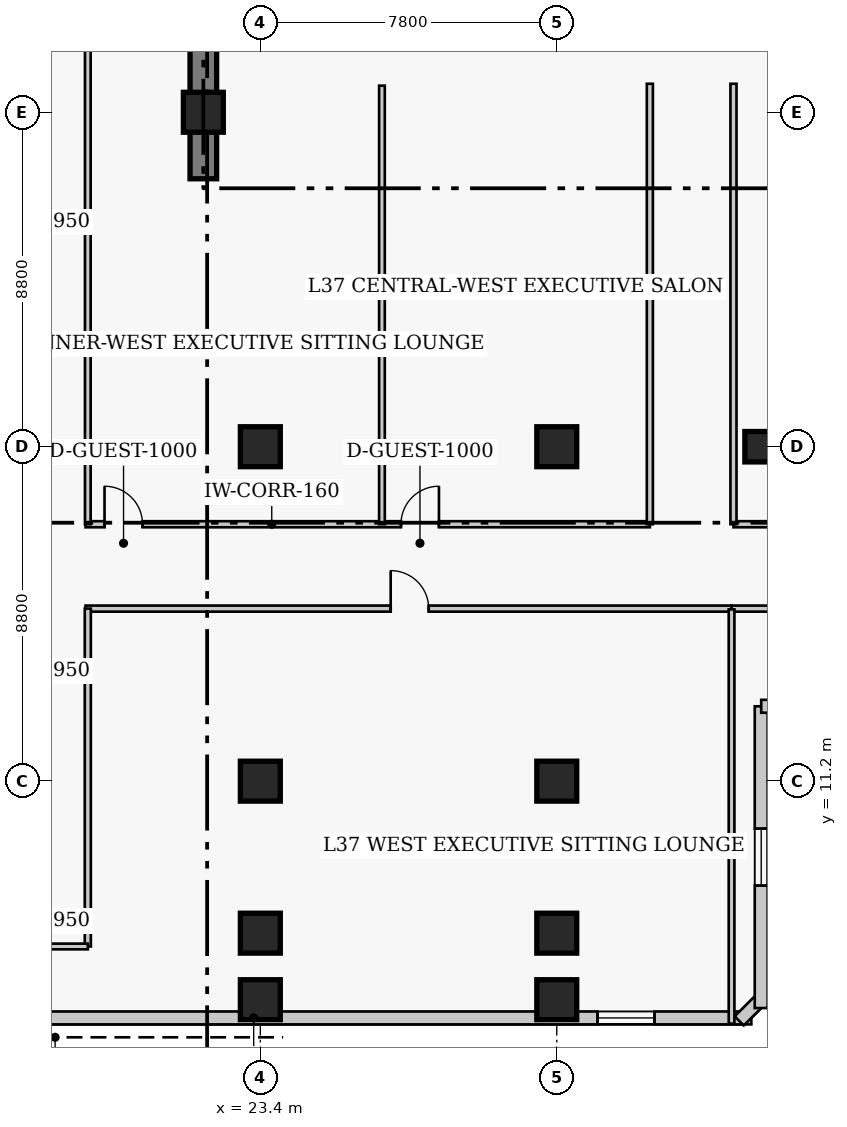
"""IFC4 building model, lengths in metres.
Left out: names, types, materials, properties, quantities, classifications, styles, units other than length and angle.
Written with IfcOpenShell. Run it as: python <this file> out.ifc"""

import sys

from ifc_helpers import new_model, si_unit, direction, frame, frame_2d, origin, origin_2d, place, context, subcontext, project, spatial, rectangle, extrude, element, fill, save


model = new_model("IFC4")
c1 = context("Model", 3, precision=1e-05, world=origin(), true_north=direction((0.0, 1.0)))
c2 = subcontext(c1, "Body", "Model", "MODEL_VIEW")
j1 = project(units=[si_unit("LENGTHUNIT", "METRE"), si_unit("PLANEANGLEUNIT", "RADIAN")], contexts=[c1])
p1 = place(None, origin())
s1 = spatial("IfcSite", under=j1, at=p1, CompositionType="ELEMENT")
p2 = place(p1, origin())
s2 = spatial("IfcBuilding", under=s1, at=p2, CompositionType="ELEMENT")
p3 = place(p2, frame((0.0, 0.0, 149.8)))
s3 = spatial("IfcBuildingStorey", under=s2, at=p3, CompositionType="ELEMENT", Elevation=149.8)
p4 = place(p3, frame((21.9, 27.05, 0.0), z_axis=(0.0, 0.0, 1.0), x_axis=(0.0, 1.0, 0.0)))
e1 = element("IfcWall", 1, at=p4, inside=s3, PredefinedType="SHEAR", context=c2, shape_type="SweptSolid", body=[
    extrude(rectangle(XDim=13.62, YDim=0.7, at=frame_2d((6.81, 0.0))), origin(), (0.0, 0.0, 1.0), 3.8),
])
for number, where, z_axis, x_axis in (
    (2, (23.4, 11.2, 0.0), (0.0, 0.0, 1.0), (1.0, 0.0, 0.0)),
    (3, (23.4, 20.0, 0.0), (0.0, 0.0, 1.0), (1.0, 0.0, 0.0)),
    (4, (31.2, 11.2, 0.0), (0.0, 0.0, 1.0), (1.0, 0.0, 0.0)),
    (5, (31.2, 20.0, 0.0), (0.0, 0.0, 1.0), (1.0, 0.0, 0.0)),
):
    element("IfcColumn", number, at=place(p3, frame(where, z_axis=z_axis, x_axis=x_axis)), inside=s3, PredefinedType="COLUMN", context=c2, shape_type="SweptSolid", body=[
        extrude(rectangle(XDim=1.05, YDim=1.05, at=origin_2d()), origin(), (0.0, 0.0, 1.0), 3.8),
    ])
p5 = place(p3, frame((36.75, 20.0, 0.0), z_axis=(0.0, 0.0, 1.0), x_axis=(1.0, 0.0, 0.0)))
e6 = element("IfcColumn", 6, at=p5, inside=s3, PredefinedType="COLUMN", context=c2, shape_type="SweptSolid", body=[
    extrude(rectangle(XDim=1.2, YDim=0.8, at=origin_2d()), origin(), (0.0, 0.0, 1.0), 3.8),
])
for number, where, z_axis, x_axis in (
    (7, (21.9, 28.8, 0.0), (0.0, 0.0, 1.0), (1.0, 0.0, 0.0)),
    (8, (23.4, 7.2, 0.0), (0.0, 0.0, 1.0), (1.0, 0.0, 0.0)),
    (9, (31.2, 7.2, 0.0), (0.0, 0.0, 1.0), (1.0, 0.0, 0.0)),
    (10, (23.4, 5.45, 0.0), (0.0, 0.0, 1.0), (1.0, 0.0, 0.0)),
    (11, (31.2, 5.45, 0.0), (0.0, 0.0, 1.0), (1.0, 0.0, 0.0)),
):
    element("IfcColumn", number, at=place(p3, frame(where, z_axis=z_axis, x_axis=x_axis)), inside=s3, PredefinedType="COLUMN", context=c2, shape_type="SweptSolid", body=[
        extrude(rectangle(XDim=1.05, YDim=1.05, at=origin_2d()), origin(), (0.0, 0.0, 1.0), 3.8),
    ])
p6 = place(p3, frame((9.63, 4.97, 0.0), z_axis=(0.0, 0.0, 1.0), x_axis=(1.0, 0.0, 0.0)))
e12 = element("IfcWall", 12, at=p6, inside=s3, PredefinedType="SOLIDWALL", context=c2, shape_type="SweptSolid", body=[
    extrude(rectangle(XDim=26.69, YDim=0.34, at=frame_2d((13.345, 0.0))), origin(), (0.0, 0.0, 1.0), 3.55),
])
p7 = place(p6, frame((3.048, 0.0, 0.85)))
e13 = element("IfcOpeningElement", 13, at=p7, cuts=e12, PredefinedType="OPENING", context=c2, shape_type="SweptSolid", body=[
    extrude(rectangle(XDim=1.5, YDim=1.75, at=frame_2d((0.75, 0.875))), frame((0.0, 0.18, 0.0), z_axis=(0.0, -1.0, 0.0), x_axis=(1.0, 0.0, 0.0)), (0.0, 0.0, 1.0), 0.36),
])
p8 = place(p6, frame((22.642, 0.0, 0.85)))
e14 = element("IfcOpeningElement", 14, at=p8, cuts=e12, PredefinedType="OPENING", context=c2, shape_type="SweptSolid", body=[
    extrude(rectangle(XDim=1.5, YDim=1.75, at=frame_2d((0.75, 0.875))), frame((0.0, 0.18, 0.0), z_axis=(0.0, -1.0, 0.0), x_axis=(1.0, 0.0, 0.0)), (0.0, 0.0, 1.0), 0.36),
])
p9 = place(p3, frame((36.001, 4.892, 0.0), z_axis=(0.0, 0.0, 1.0), x_axis=(0.707106781187, 0.707106781187, 0.0)))
e15 = element("IfcWall", 15, at=p9, inside=s3, PredefinedType="SOLIDWALL", context=c2, shape_type="SweptSolid", body=[
    extrude(rectangle(XDim=0.929, YDim=0.34, at=frame_2d((0.464, 0.0))), origin(), (0.0, 0.0, 1.0), 3.55),
])
p10 = place(p3, frame((36.58, 5.23, 0.0), z_axis=(0.0, 0.0, 1.0), x_axis=(0.0, 1.0, 0.0)))
e16 = element("IfcWall", 16, at=p10, inside=s3, PredefinedType="SOLIDWALL", context=c2, shape_type="SweptSolid", body=[
    extrude(rectangle(XDim=7.94, YDim=0.34, at=frame_2d((3.97, 0.0))), origin(), (0.0, 0.0, 1.0), 3.55),
])
p11 = place(p10, frame((3.22, 0.0, 0.85)))
e17 = element("IfcOpeningElement", 17, at=p11, cuts=e16, PredefinedType="OPENING", context=c2, shape_type="SweptSolid", body=[
    extrude(rectangle(XDim=1.5, YDim=1.75, at=frame_2d((0.75, 0.875))), frame((0.0, 0.18, 0.0), z_axis=(0.0, -1.0, 0.0), x_axis=(1.0, 0.0, 0.0)), (0.0, 0.0, 1.0), 0.36),
])
p12 = place(p3, frame((36.58, 13.17, 0.0), z_axis=(0.0, 0.0, 1.0), x_axis=(1.0, 0.0, 0.0)))
e18 = element("IfcWall", 18, at=p12, inside=s3, PredefinedType="SOLIDWALL", context=c2, shape_type="SweptSolid", body=[
    extrude(rectangle(XDim=4.84, YDim=0.34, at=frame_2d((2.42, 0.0))), origin(), (0.0, 0.0, 1.0), 3.55),
])
p13 = place(p12, frame((1.67, 0.0, 0.85)))
e19 = element("IfcOpeningElement", 19, at=p13, cuts=e18, PredefinedType="OPENING", context=c2, shape_type="SweptSolid", body=[
    extrude(rectangle(XDim=1.5, YDim=1.75, at=frame_2d((0.75, 0.875))), frame((0.0, 0.18, 0.0), z_axis=(0.0, -1.0, 0.0), x_axis=(1.0, 0.0, 0.0)), (0.0, 0.0, 1.0), 0.36),
])
p14 = place(p3, frame((18.8, 17.96, 0.0), z_axis=(0.0, 0.0, 1.0), x_axis=(1.0, 0.0, 0.0)))
e20 = element("IfcWall", 20, at=p14, inside=s3, PredefinedType="PARTITIONING", context=c2, shape_type="SweptSolid", body=[
    extrude(rectangle(XDim=14.85, YDim=0.16, at=frame_2d((7.425, 0.0))), origin(), (0.0, 0.0, 1.0), 3.55),
])
p15 = place(p14, frame((0.5, 0.0, 0.0)))
e21 = element("IfcOpeningElement", 21, at=p15, cuts=e20, PredefinedType="OPENING", context=c2, shape_type="SweptSolid", body=[
    extrude(rectangle(XDim=1.0, YDim=2.15, at=frame_2d((0.5, 1.075))), frame((0.0, 0.09, 0.0), z_axis=(0.0, -1.0, 0.0), x_axis=(1.0, 0.0, 0.0)), (0.0, 0.0, 1.0), 0.18),
])
p16 = place(p14, frame((8.3, 0.0, 0.0)))
e22 = element("IfcOpeningElement", 22, at=p16, cuts=e20, PredefinedType="OPENING", context=c2, shape_type="SweptSolid", body=[
    extrude(rectangle(XDim=1.0, YDim=2.15, at=frame_2d((0.5, 1.075))), frame((0.0, 0.09, 0.0), z_axis=(0.0, -1.0, 0.0), x_axis=(1.0, 0.0, 0.0)), (0.0, 0.0, 1.0), 0.18),
])
p17 = place(p3, frame((35.85, 17.96, 0.0), z_axis=(0.0, 0.0, 1.0), x_axis=(1.0, 0.0, 0.0)))
e23 = element("IfcWall", 23, at=p17, inside=s3, PredefinedType="PARTITIONING", context=c2, shape_type="SweptSolid", body=[
    extrude(rectangle(XDim=23.45, YDim=0.16, at=frame_2d((11.725, 0.0))), origin(), (0.0, 0.0, 1.0), 3.55),
])
p18 = place(p17, frame((6.45, 0.0, 0.0)))
e24 = element("IfcOpeningElement", 24, at=p18, cuts=e23, PredefinedType="OPENING", context=c2, shape_type="SweptSolid", body=[
    extrude(rectangle(XDim=1.0, YDim=2.15, at=frame_2d((0.5, 1.075))), frame((0.0, 0.09, 0.0), z_axis=(0.0, -1.0, 0.0), x_axis=(1.0, 0.0, 0.0)), (0.0, 0.0, 1.0), 0.18),
])
p19 = place(p17, frame((16.25, 0.0, 0.0)))
e25 = element("IfcOpeningElement", 25, at=p19, cuts=e23, PredefinedType="OPENING", context=c2, shape_type="SweptSolid", body=[
    extrude(rectangle(XDim=1.0, YDim=2.15, at=frame_2d((0.5, 1.075))), frame((0.0, 0.09, 0.0), z_axis=(0.0, -1.0, 0.0), x_axis=(1.0, 0.0, 0.0)), (0.0, 0.0, 1.0), 0.18),
])
for number, where, z_axis, x_axis in (
    (26, (33.65, 17.96, 0.0), (0.0, 0.0, 1.0), (0.0, 1.0, 0.0)),
    (27, (35.85, 17.96, 0.0), (0.0, 0.0, 1.0), (0.0, 1.0, 0.0)),
):
    element("IfcWall", number, at=place(p3, frame(where, z_axis=z_axis, x_axis=x_axis)), inside=s3, PredefinedType="PARTITIONING", context=c2, shape_type="SweptSolid", body=[
        extrude(rectangle(XDim=11.59, YDim=0.16, at=frame_2d((5.795, 0.0))), origin(), (0.0, 0.0, 1.0), 3.55),
    ])
p20 = place(p3, frame((18.8, 15.74, 0.0), z_axis=(0.0, 0.0, 1.0), x_axis=(1.0, 0.0, 0.0)))
e28 = element("IfcWall", 28, at=p20, inside=s3, PredefinedType="PARTITIONING", context=c2, shape_type="SweptSolid", body=[
    extrude(rectangle(XDim=17.0, YDim=0.16, at=frame_2d((8.5, 0.0))), origin(), (0.0, 0.0, 1.0), 3.55),
])
p21 = place(p20, frame((8.03, 0.0, 0.0)))
e29 = element("IfcOpeningElement", 29, at=p21, cuts=e28, PredefinedType="OPENING", context=c2, shape_type="SweptSolid", body=[
    extrude(rectangle(XDim=1.0, YDim=2.15, at=frame_2d((0.5, 1.075))), frame((0.0, 0.09, 0.0), z_axis=(0.0, -1.0, 0.0), x_axis=(1.0, 0.0, 0.0)), (0.0, 0.0, 1.0), 0.18),
])
p22 = place(p3, frame((35.8, 15.74, 0.0), z_axis=(0.0, 0.0, 1.0), x_axis=(1.0, 0.0, 0.0)))
e30 = element("IfcWall", 30, at=p22, inside=s3, PredefinedType="PARTITIONING", context=c2, shape_type="SweptSolid", body=[
    extrude(rectangle(XDim=23.5, YDim=0.16, at=frame_2d((11.75, 0.0))), origin(), (0.0, 0.0, 1.0), 3.55),
])
p23 = place(p22, frame((3.66, 0.0, 0.0)))
e31 = element("IfcOpeningElement", 31, at=p23, cuts=e30, PredefinedType="OPENING", context=c2, shape_type="SweptSolid", body=[
    extrude(rectangle(XDim=0.95, YDim=2.1, at=frame_2d((0.475, 1.05))), frame((0.0, 0.09, 0.0), z_axis=(0.0, -1.0, 0.0), x_axis=(1.0, 0.0, 0.0)), (0.0, 0.0, 1.0), 0.18),
])
p24 = place(p22, frame((16.805, 0.0, 0.0)))
e32 = element("IfcOpeningElement", 32, at=p24, cuts=e30, PredefinedType="OPENING", context=c2, shape_type="SweptSolid", body=[
    extrude(rectangle(XDim=1.0, YDim=2.15, at=frame_2d((0.5, 1.075))), frame((0.0, 0.09, 0.0), z_axis=(0.0, -1.0, 0.0), x_axis=(1.0, 0.0, 0.0)), (0.0, 0.0, 1.0), 0.18),
])
p25 = place(p3, frame((18.86, 6.85, 0.0), z_axis=(0.0, 0.0, 1.0), x_axis=(0.0, 1.0, 0.0)))
e33 = element("IfcWall", 33, at=p25, inside=s3, PredefinedType="PARTITIONING", context=c2, shape_type="SweptSolid", body=[
    extrude(rectangle(XDim=8.89, YDim=0.16, at=frame_2d((4.445, 0.0))), origin(), (0.0, 0.0, 1.0), 3.55),
])
p26 = place(p3, frame((16.64, 6.85, 0.0), z_axis=(0.0, 0.0, 1.0), x_axis=(1.0, 0.0, 0.0)))
e34 = element("IfcWall", 34, at=p26, inside=s3, PredefinedType="PARTITIONING", context=c2, shape_type="SweptSolid", body=[
    extrude(rectangle(XDim=2.22, YDim=0.15, at=frame_2d((1.11, 0.0))), origin(), (0.0, 0.0, 1.0), 3.55),
])
p27 = place(p3, frame((18.86, 17.96, 0.0), z_axis=(0.0, 0.0, 1.0), x_axis=(0.0, 1.0, 0.0)))
e35 = element("IfcWall", 35, at=p27, inside=s3, PredefinedType="PARTITIONING", context=c2, shape_type="SweptSolid", body=[
    extrude(rectangle(XDim=14.84, YDim=0.15, at=frame_2d((7.42, 0.0))), origin(), (0.0, 0.0, 1.0), 3.55),
])
p28 = place(p3, frame((26.6, 17.96, 0.0), z_axis=(0.0, 0.0, 1.0), x_axis=(0.0, 1.0, 0.0)))
e36 = element("IfcWall", 36, at=p28, inside=s3, PredefinedType="PARTITIONING", context=c2, shape_type="SweptSolid", body=[
    extrude(rectangle(XDim=11.54, YDim=0.15, at=frame_2d((5.77, 0.0))), origin(), (0.0, 0.0, 1.0), 3.55),
])
p29 = place(p3, frame((35.8, 4.82, 0.0), z_axis=(0.0, 0.0, 1.0), x_axis=(0.0, 1.0, 0.0)))
e37 = element("IfcWall", 37, at=p29, inside=s3, PredefinedType="PARTITIONING", context=c2, shape_type="SweptSolid", body=[
    extrude(rectangle(XDim=10.9, YDim=0.15, at=frame_2d((5.45, 0.0))), origin(), (0.0, 0.0, 1.0), 3.55),
])
p30 = place(p8, origin())
e38 = element("IfcWindow", 38, at=p30, inside=s3, PartitioningType="SINGLE_PANEL", PredefinedType="WINDOW", context=c2, shape_type="SweptSolid", body=[
    extrude(rectangle(XDim=1.5, YDim=1.75, at=frame_2d((0.75, 0.875))), frame((0.0, 0.03, 0.0), z_axis=(0.0, -1.0, 0.0), x_axis=(1.0, 0.0, 0.0)), (0.0, 0.0, 1.0), 0.06),
])
fill(e14, e38)
p31 = place(p11, origin())
e39 = element("IfcWindow", 39, at=p31, inside=s3, PartitioningType="SINGLE_PANEL", PredefinedType="WINDOW", context=c2, shape_type="SweptSolid", body=[
    extrude(rectangle(XDim=1.5, YDim=1.75, at=frame_2d((0.75, 0.875))), frame((0.0, 0.03, 0.0), z_axis=(0.0, -1.0, 0.0), x_axis=(1.0, 0.0, 0.0)), (0.0, 0.0, 1.0), 0.06),
])
fill(e17, e39)
p32 = place(p15, origin())
e40 = element("IfcDoor", 40, at=p32, inside=s3, OperationType="SINGLE_SWING_LEFT", PredefinedType="DOOR", context=c2, shape_type="SweptSolid", body=[
    extrude(rectangle(XDim=1.0, YDim=2.15, at=frame_2d((0.5, 1.075))), frame((0.0, 0.025, 0.0), z_axis=(0.0, -1.0, 0.0), x_axis=(1.0, 0.0, 0.0)), (0.0, 0.0, 1.0), 0.05),
])
fill(e21, e40)
p33 = place(p16, origin())
e41 = element("IfcDoor", 41, at=p33, inside=s3, OperationType="SINGLE_SWING_RIGHT", PredefinedType="DOOR", context=c2, shape_type="SweptSolid", body=[
    extrude(rectangle(XDim=1.0, YDim=2.15, at=frame_2d((0.5, 1.075))), frame((0.0, 0.025, 0.0), z_axis=(0.0, -1.0, 0.0), x_axis=(1.0, 0.0, 0.0)), (0.0, 0.0, 1.0), 0.05),
])
fill(e22, e41)
p34 = place(p21, origin())
e42 = element("IfcDoor", 42, at=p34, inside=s3, OperationType="SINGLE_SWING_LEFT", PredefinedType="DOOR", context=c2, shape_type="SweptSolid", body=[
    extrude(rectangle(XDim=1.0, YDim=2.15, at=frame_2d((0.5, 1.075))), frame((0.0, 0.025, 0.0), z_axis=(0.0, -1.0, 0.0), x_axis=(1.0, 0.0, 0.0)), (0.0, 0.0, 1.0), 0.05),
])
fill(e29, e42)
save(model, sys.argv[1])
